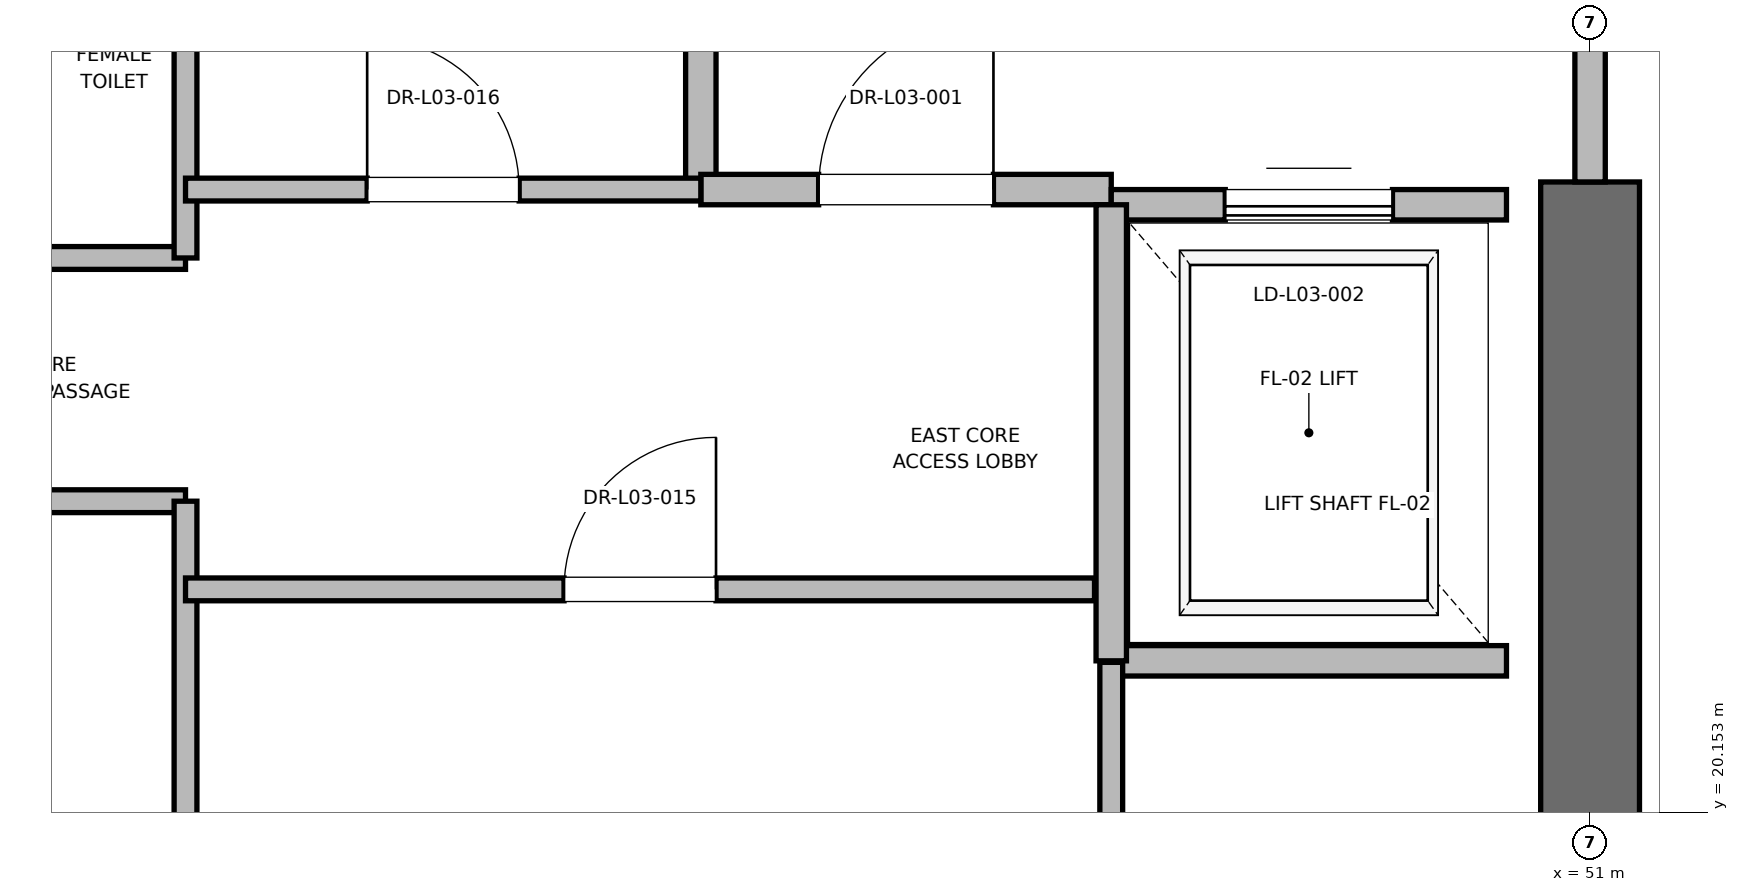
"""IFC4 building model, lengths in metres.
Left out: names, types, materials, properties, quantities, classifications, styles, units other than length and angle.
Written with IfcOpenShell. Run it as: python <this file> out.ifc"""

import sys

from ifc_helpers import new_model, si_unit, direction, frame, frame_2d, origin, place, context, subcontext, project, spatial, rectangle, extrude, element, fill, save


model = new_model("IFC4")
c1 = context("Model", 3, precision=1e-05, world=origin(), true_north=direction((0.0, 1.0)))
c2 = subcontext(c1, "Body", "Model", "MODEL_VIEW")
j1 = project(units=[si_unit("LENGTHUNIT", "METRE"), si_unit("PLANEANGLEUNIT", "RADIAN")], contexts=[c1])
p1 = place(None, origin())
s1 = spatial("IfcSite", under=j1, at=p1, CompositionType="ELEMENT")
p2 = place(p1, origin())
s2 = spatial("IfcBuilding", under=s1, at=p2, CompositionType="ELEMENT")
p3 = place(p2, frame((0.0, 0.0, 16.4)))
s3 = spatial("IfcBuildingStorey", under=s2, at=p3, CompositionType="ELEMENT", Elevation=16.4)
p4 = place(p3, frame((51.0, 18.5, 0.0), z_axis=(0.0, 0.0, 1.0), x_axis=(0.0, 1.0, 0.0)))
e1 = element("IfcWall", 1, at=p4, inside=s3, PredefinedType="SHEAR", context=c2, shape_type="SweptSolid", body=[
    extrude(rectangle(XDim=5.8, YDim=0.65, at=frame_2d((2.9, 0.0))), origin(), (0.0, 0.0, 1.0), 4.9),
])
p5 = place(p3, frame((45.15, 24.25, 0.0), z_axis=(0.0, 0.0, 1.0), x_axis=(0.0, 1.0, 0.0)))
e2 = element("IfcWall", 2, at=p5, inside=s3, PredefinedType="PARTITIONING", context=c2, shape_type="SweptSolid", body=[
    extrude(rectangle(XDim=3.37, YDim=0.2, at=frame_2d((1.685, 0.0))), origin(), (0.0, 0.0, 1.0), 4.9),
])
p6 = place(p3, frame((45.15, 24.25, 0.0), z_axis=(0.0, 0.0, 1.0), x_axis=(1.0, 0.0, 0.0)))
e3 = element("IfcWall", 3, at=p6, inside=s3, PredefinedType="PARTITIONING", context=c2, shape_type="SweptSolid", body=[
    extrude(rectangle(XDim=2.7, YDim=0.2, at=frame_2d((1.35, 0.0))), origin(), (0.0, 0.0, 1.0), 4.9),
])
p7 = place(p6, frame((0.775, 0.0, 0.0)))
e4 = element("IfcOpeningElement", 4, at=p7, cuts=e3, PredefinedType="OPENING", context=c2, shape_type="SweptSolid", body=[
    extrude(rectangle(XDim=1.15, YDim=2.2, at=frame_2d((0.575, 1.1))), frame((0.0, 0.1, 0.0), z_axis=(0.0, -1.0, 0.0), x_axis=(1.0, 0.0, 0.0)), (0.0, 0.0, 1.0), 0.2),
])
p8 = place(p3, frame((51.0, 24.3, 0.0), z_axis=(0.0, 0.0, 1.0), x_axis=(0.0, 1.0, 0.0)))
e5 = element("IfcWall", 5, at=p8, inside=s3, PredefinedType="PARTITIONING", context=c2, shape_type="SweptSolid", body=[
    extrude(rectangle(XDim=3.4, YDim=0.2, at=frame_2d((1.7, 0.0))), origin(), (0.0, 0.0, 1.0), 3.68),
])
p9 = place(p8, frame((1.125, 0.0, 0.0)))
e6 = element("IfcOpeningElement", 6, at=p9, cuts=e5, PredefinedType="OPENING", context=c2, shape_type="SweptSolid", body=[
    extrude(rectangle(XDim=1.15, YDim=2.2, at=frame_2d((0.575, 1.1))), frame((0.0, 0.1, 0.0), z_axis=(0.0, -1.0, 0.0), x_axis=(1.0, 0.0, 0.0)), (0.0, 0.0, 1.0), 0.2),
])
p10 = place(p3, frame((47.85, 21.15, 0.0), z_axis=(0.0, 0.0, 1.0), x_axis=(1.0, 0.0, 0.0)))
e7 = element("IfcWall", 7, at=p10, inside=s3, PredefinedType="SOLIDWALL", context=c2, shape_type="SweptSolid", body=[
    extrude(rectangle(XDim=2.6, YDim=0.2, at=frame_2d((1.3, 0.0))), origin(), (0.0, 0.0, 1.0), 4.9),
])
p11 = place(p3, frame((50.45, 24.15, 0.0), z_axis=(0.0, 0.0, 1.0), x_axis=(-1.0, 0.0, 0.0)))
e8 = element("IfcWall", 8, at=p11, inside=s3, PredefinedType="SOLIDWALL", context=c2, shape_type="SweptSolid", body=[
    extrude(rectangle(XDim=2.6, YDim=0.2, at=frame_2d((1.3, 0.0))), origin(), (0.0, 0.0, 1.0), 3.68),
])
p12 = place(p11, frame((0.75, 0.0, 0.0)))
e9 = element("IfcOpeningElement", 9, at=p12, cuts=e8, PredefinedType="OPENING", context=c2, shape_type="SweptSolid", body=[
    extrude(rectangle(XDim=1.1, YDim=2.2, at=frame_2d((0.55, 1.1))), frame((0.0, 0.1, 0.0), z_axis=(0.0, -1.0, 0.0), x_axis=(1.0, 0.0, 0.0)), (0.0, 0.0, 1.0), 0.2),
])
p13 = place(p3, frame((47.85, 24.15, 0.0), z_axis=(0.0, 0.0, 1.0), x_axis=(0.0, -1.0, 0.0)))
e10 = element("IfcWall", 10, at=p13, inside=s3, PredefinedType="SOLIDWALL", context=c2, shape_type="SweptSolid", body=[
    extrude(rectangle(XDim=3.0, YDim=0.2, at=frame_2d((1.5, 0.0))), origin(), (0.0, 0.0, 1.0), 4.9),
])
for number, where, z_axis, x_axis in (
    (11, (39.95, 22.2, 0.0), (0.0, 0.0, 1.0), (1.0, 0.0, 0.0)),
    (12, (39.95, 23.8, 0.0), (0.0, 0.0, 1.0), (1.0, 0.0, 0.0)),
):
    element("IfcWall", number, at=place(p3, frame(where, z_axis=z_axis, x_axis=x_axis)), inside=s3, PredefinedType="PARTITIONING", context=c2, shape_type="SweptSolid", body=[
        extrude(rectangle(XDim=1.81, YDim=0.15, at=frame_2d((0.905, 0.0))), origin(), (0.0, 0.0, 1.0), 2.85),
    ])
p14 = place(p3, frame((41.76, 18.6, 0.0), z_axis=(0.0, 0.0, 1.0), x_axis=(0.0, 1.0, 0.0)))
e13 = element("IfcWall", 13, at=p14, inside=s3, PredefinedType="PARTITIONING", context=c2, shape_type="SweptSolid", body=[
    extrude(rectangle(XDim=3.6, YDim=0.15, at=frame_2d((1.8, 0.0))), origin(), (0.0, 0.0, 1.0), 2.85),
])
p15 = place(p3, frame((41.76, 23.8, 0.0), z_axis=(0.0, 0.0, 1.0), x_axis=(0.0, 1.0, 0.0)))
e14 = element("IfcWall", 14, at=p15, inside=s3, PredefinedType="PARTITIONING", context=c2, shape_type="SweptSolid", body=[
    extrude(rectangle(XDim=4.0, YDim=0.15, at=frame_2d((2.0, 0.0))), origin(), (0.0, 0.0, 1.0), 2.85),
])
p16 = place(p3, frame((47.85, 18.6, 0.0), z_axis=(0.0, 0.0, 1.0), x_axis=(0.0, 1.0, 0.0)))
e15 = element("IfcWall", 15, at=p16, inside=s3, PredefinedType="PARTITIONING", context=c2, shape_type="SweptSolid", body=[
    extrude(rectangle(XDim=2.54, YDim=0.15, at=frame_2d((1.27, 0.0))), origin(), (0.0, 0.0, 1.0), 2.85),
])
p17 = place(p3, frame((41.76, 21.62, 0.0), z_axis=(0.0, 0.0, 1.0), x_axis=(1.0, 0.0, 0.0)))
e16 = element("IfcWall", 16, at=p17, inside=s3, PredefinedType="PARTITIONING", context=c2, shape_type="SweptSolid", body=[
    extrude(rectangle(XDim=5.98, YDim=0.15, at=frame_2d((2.99, 0.0))), origin(), (0.0, 0.0, 1.0), 2.85),
])
p18 = place(p17, frame((2.49, 0.0, 0.0)))
e17 = element("IfcOpeningElement", 17, at=p18, cuts=e16, PredefinedType="OPENING", context=c2, shape_type="SweptSolid", body=[
    extrude(rectangle(XDim=1.0, YDim=2.15, at=frame_2d((0.5, 1.075))), frame((0.0, 0.075, 0.0), z_axis=(0.0, -1.0, 0.0), x_axis=(1.0, 0.0, 0.0)), (0.0, 0.0, 1.0), 0.15),
])
p19 = place(p3, frame((41.76, 24.25, 0.0), z_axis=(0.0, 0.0, 1.0), x_axis=(1.0, 0.0, 0.0)))
e18 = element("IfcWall", 18, at=p19, inside=s3, PredefinedType="PARTITIONING", context=c2, shape_type="SweptSolid", body=[
    extrude(rectangle(XDim=3.39, YDim=0.15, at=frame_2d((1.695, 0.0))), origin(), (0.0, 0.0, 1.0), 2.85),
])
p20 = place(p19, frame((1.195, 0.0, 0.0)))
e19 = element("IfcOpeningElement", 19, at=p20, cuts=e18, PredefinedType="OPENING", context=c2, shape_type="SweptSolid", body=[
    extrude(rectangle(XDim=1.0, YDim=2.15, at=frame_2d((0.5, 1.075))), frame((0.0, 0.075, 0.0), z_axis=(0.0, -1.0, 0.0), x_axis=(1.0, 0.0, 0.0)), (0.0, 0.0, 1.0), 0.15),
])
p21 = place(p7, origin())
e20 = element("IfcDoor", 20, at=p21, inside=s3, OperationType="SINGLE_SWING_RIGHT", PredefinedType="DOOR", context=c2, shape_type="SweptSolid", body=[
    extrude(rectangle(XDim=1.15, YDim=2.2, at=frame_2d((0.575, 1.1))), frame((0.0, 0.025, 0.0), z_axis=(0.0, -1.0, 0.0), x_axis=(1.0, 0.0, 0.0)), (0.0, 0.0, 1.0), 0.05),
])
fill(e4, e20)
p22 = place(p12, origin())
e21 = element("IfcDoor", 21, at=p22, inside=s3, OperationType="SLIDING_TO_RIGHT", PredefinedType="DOOR", context=c2, shape_type="SweptSolid", body=[
    extrude(rectangle(XDim=1.1, YDim=2.2, at=frame_2d((0.55, 1.1))), frame((0.0, 0.025, 0.0), z_axis=(0.0, -1.0, 0.0), x_axis=(1.0, 0.0, 0.0)), (0.0, 0.0, 1.0), 0.05),
])
fill(e9, e21)
p23 = place(p18, origin())
e22 = element("IfcDoor", 22, at=p23, inside=s3, OperationType="SINGLE_SWING_RIGHT", PredefinedType="DOOR", context=c2, shape_type="SweptSolid", body=[
    extrude(rectangle(XDim=1.0, YDim=2.15, at=frame_2d((0.5, 1.075))), frame((0.0, 0.025, 0.0), z_axis=(0.0, -1.0, 0.0), x_axis=(1.0, 0.0, 0.0)), (0.0, 0.0, 1.0), 0.05),
])
fill(e17, e22)
p24 = place(p20, origin())
e23 = element("IfcDoor", 23, at=p24, inside=s3, OperationType="SINGLE_SWING_LEFT", PredefinedType="DOOR", context=c2, shape_type="SweptSolid", body=[
    extrude(rectangle(XDim=1.0, YDim=2.15, at=frame_2d((0.5, 1.075))), frame((0.0, 0.025, 0.0), z_axis=(0.0, -1.0, 0.0), x_axis=(1.0, 0.0, 0.0)), (0.0, 0.0, 1.0), 0.05),
])
fill(e19, e23)
save(model, sys.argv[1])
